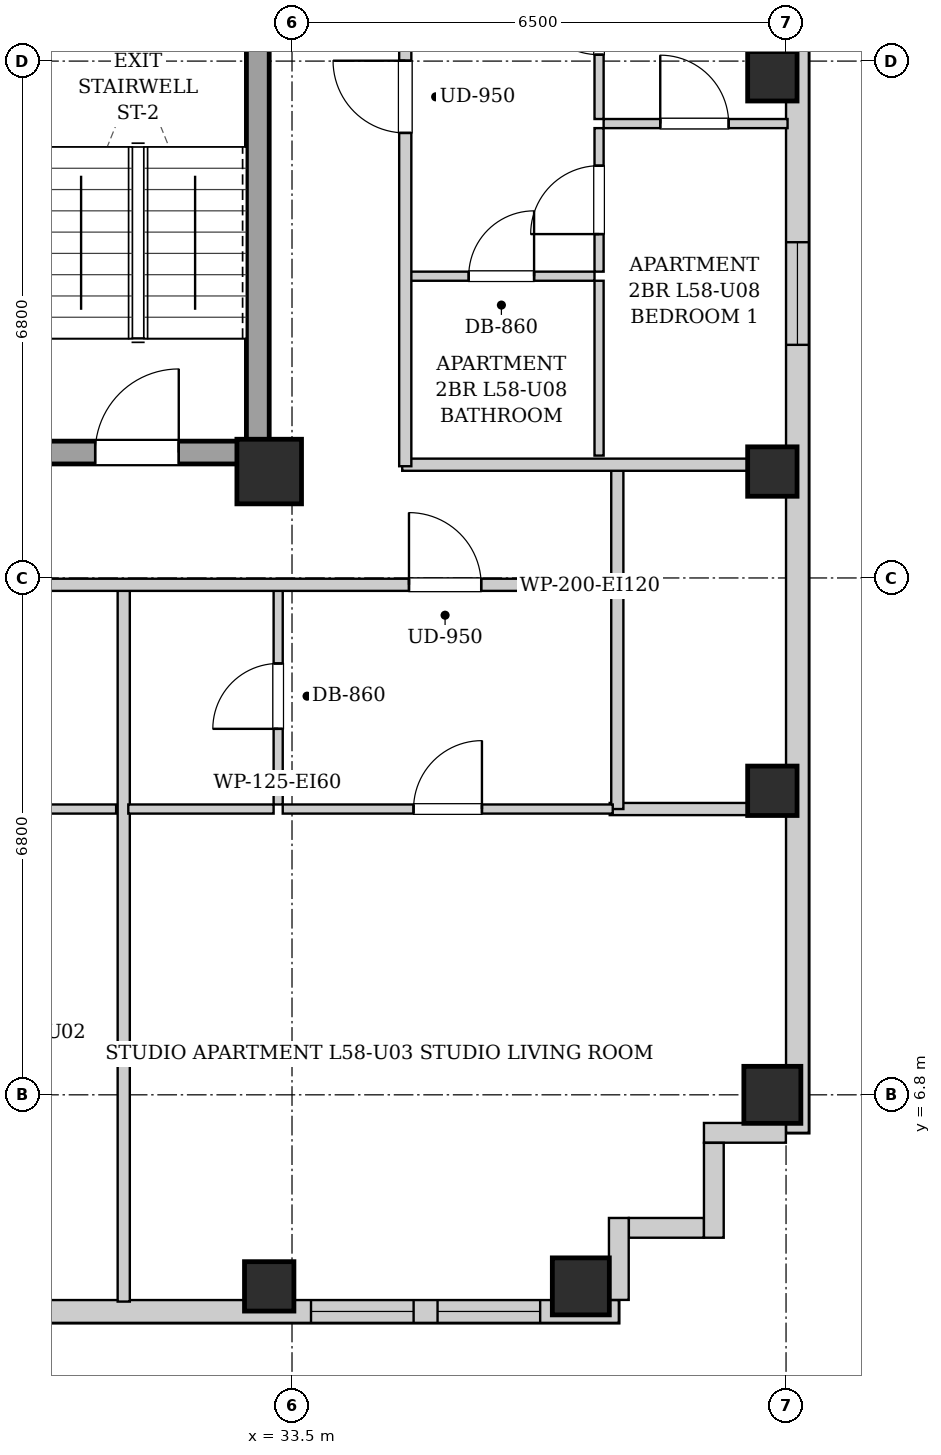
"""IFC4 building model, lengths in metres.
Left out: names, types, materials, properties, quantities, classifications, styles, units other than length and angle.
Written with IfcOpenShell. Run it as: python <this file> out.ifc"""

import sys

from ifc_helpers import new_model, si_unit, direction, frame, frame_2d, origin, origin_2d, place, context, subcontext, project, spatial, rectangle, extrude, element, fill, save


model = new_model("IFC4")
c1 = context("Model", 3, precision=1e-05, world=origin(), true_north=direction((0.0, 1.0)))
c2 = subcontext(c1, "Body", "Model", "MODEL_VIEW")
j1 = project(units=[si_unit("LENGTHUNIT", "METRE"), si_unit("PLANEANGLEUNIT", "RADIAN")], contexts=[c1])
p1 = place(None, origin())
s1 = spatial("IfcSite", under=j1, at=p1, CompositionType="ELEMENT")
p2 = place(p1, origin())
s2 = spatial("IfcBuilding", under=s1, at=p2, CompositionType="ELEMENT")
p3 = place(p2, frame((0.0, 0.0, 200.8)))
s3 = spatial("IfcBuildingStorey", under=s2, at=p3, CompositionType="ELEMENT", Elevation=200.8)
p4 = place(p3, frame((33.2, 4.28, 0.0), z_axis=(0.0, 0.0, 1.0), x_axis=(1.0, 0.0, 0.0)))
e1 = element("IfcColumn", 1, at=p4, inside=s3, PredefinedType="COLUMN", context=c2, shape_type="SweptSolid", body=[
    extrude(rectangle(XDim=0.65, YDim=0.65, at=origin_2d()), origin(), (0.0, 0.0, 1.0), 3.3),
])
for number, where, z_axis, x_axis in (
    (2, (37.3, 4.28, 0.0), (0.0, 0.0, 1.0), (1.0, 0.0, 0.0)),
    (3, (39.82, 6.8, 0.0), (0.0, 0.0, 1.0), (1.0, 0.0, 0.0)),
):
    element("IfcColumn", number, at=place(p3, frame(where, z_axis=z_axis, x_axis=x_axis)), inside=s3, PredefinedType="COLUMN", context=c2, shape_type="SweptSolid", body=[
        extrude(rectangle(XDim=0.75, YDim=0.75, at=origin_2d()), origin(), (0.0, 0.0, 1.0), 3.3),
    ])
for number, where, z_axis, x_axis in (
    (4, (39.82, 10.8, 0.0), (0.0, 0.0, 1.0), (1.0, 0.0, 0.0)),
    (5, (39.82, 15.0, 0.0), (0.0, 0.0, 1.0), (1.0, 0.0, 0.0)),
    (6, (39.82, 20.2, 0.0), (0.0, 0.0, 1.0), (1.0, 0.0, 0.0)),
):
    element("IfcColumn", number, at=place(p3, frame(where, z_axis=z_axis, x_axis=x_axis)), inside=s3, PredefinedType="COLUMN", context=c2, shape_type="SweptSolid", body=[
        extrude(rectangle(XDim=0.65, YDim=0.65, at=origin_2d()), origin(), (0.0, 0.0, 1.0), 3.3),
    ])
p5 = place(p3, frame((33.2, 15.0, 0.0), z_axis=(0.0, 0.0, 1.0), x_axis=(1.0, 0.0, 0.0)))
e7 = element("IfcColumn", 7, at=p5, inside=s3, PredefinedType="COLUMN", context=c2, shape_type="SweptSolid", body=[
    extrude(rectangle(XDim=0.85, YDim=0.85, at=origin_2d()), origin(), (0.0, 0.0, 1.0), 3.3),
])
p6 = place(p3, frame((40.15, 37.7, 0.0), z_axis=(0.0, 0.0, 1.0), x_axis=(0.0, -1.0, 0.0)))
e8 = element("IfcWall", 8, at=p6, inside=s3, PredefinedType="SOLIDWALL", context=c2, shape_type="SweptSolid", body=[
    extrude(rectangle(XDim=31.4, YDim=0.3, at=frame_2d((15.7, 0.0))), origin(), (0.0, 0.0, 1.0), 3.04),
])
p7 = place(p6, frame((1.504, 0.0, 0.55)))
e9 = element("IfcOpeningElement", 9, at=p7, cuts=e8, PredefinedType="OPENING", context=c2, shape_type="SweptSolid", body=[
    extrude(rectangle(XDim=1.35, YDim=1.2, at=frame_2d((0.675, 0.6))), frame((0.0, 0.16, 0.0), z_axis=(0.0, -1.0, 0.0), x_axis=(1.0, 0.0, 0.0)), (0.0, 0.0, 1.0), 0.32),
])
p8 = place(p6, frame((19.683, 0.0, 0.55)))
e10 = element("IfcOpeningElement", 10, at=p8, cuts=e8, PredefinedType="OPENING", context=c2, shape_type="SweptSolid", body=[
    extrude(rectangle(XDim=1.35, YDim=1.2, at=frame_2d((0.675, 0.6))), frame((0.0, 0.16, 0.0), z_axis=(0.0, -1.0, 0.0), x_axis=(1.0, 0.0, 0.0)), (0.0, 0.0, 1.0), 0.32),
])
p9 = place(p6, frame((10.367, 0.0, 0.55)))
e11 = element("IfcOpeningElement", 11, at=p9, cuts=e8, PredefinedType="OPENING", context=c2, shape_type="SweptSolid", body=[
    extrude(rectangle(XDim=1.35, YDim=1.2, at=frame_2d((0.675, 0.6))), frame((0.0, 0.16, 0.0), z_axis=(0.0, -1.0, 0.0), x_axis=(1.0, 0.0, 0.0)), (0.0, 0.0, 1.0), 0.32),
])
p10 = place(p3, frame((37.8, 3.95, 0.0), z_axis=(0.0, 0.0, 1.0), x_axis=(-1.0, 0.0, 0.0)))
e12 = element("IfcWall", 12, at=p10, inside=s3, PredefinedType="SOLIDWALL", context=c2, shape_type="SweptSolid", body=[
    extrude(rectangle(XDim=18.15, YDim=0.3, at=frame_2d((9.075, 0.0))), origin(), (0.0, 0.0, 1.0), 3.04),
])
p11 = place(p10, frame((15.6, 0.0, 0.55)))
e13 = element("IfcOpeningElement", 13, at=p11, cuts=e12, PredefinedType="OPENING", context=c2, shape_type="SweptSolid", body=[
    extrude(rectangle(XDim=1.35, YDim=1.2, at=frame_2d((0.675, 0.6))), frame((0.0, 0.16, 0.0), z_axis=(0.0, -1.0, 0.0), x_axis=(1.0, 0.0, 0.0)), (0.0, 0.0, 1.0), 0.32),
])
p12 = place(p10, frame((8.1, 0.0, 0.55)))
e14 = element("IfcOpeningElement", 14, at=p12, cuts=e12, PredefinedType="OPENING", context=c2, shape_type="SweptSolid", body=[
    extrude(rectangle(XDim=1.35, YDim=1.2, at=frame_2d((0.675, 0.6))), frame((0.0, 0.16, 0.0), z_axis=(0.0, -1.0, 0.0), x_axis=(1.0, 0.0, 0.0)), (0.0, 0.0, 1.0), 0.32),
])
p13 = place(p10, frame((2.7, 0.0, 0.55)))
e15 = element("IfcOpeningElement", 15, at=p13, cuts=e12, PredefinedType="OPENING", context=c2, shape_type="SweptSolid", body=[
    extrude(rectangle(XDim=1.35, YDim=1.2, at=frame_2d((0.675, 0.6))), frame((0.0, 0.16, 0.0), z_axis=(0.0, -1.0, 0.0), x_axis=(1.0, 0.0, 0.0)), (0.0, 0.0, 1.0), 0.32),
])
p14 = place(p10, frame((1.035, 0.0, 0.55)))
e16 = element("IfcOpeningElement", 16, at=p14, cuts=e12, PredefinedType="OPENING", context=c2, shape_type="SweptSolid", body=[
    extrude(rectangle(XDim=1.35, YDim=1.2, at=frame_2d((0.675, 0.6))), frame((0.0, 0.16, 0.0), z_axis=(0.0, -1.0, 0.0), x_axis=(1.0, 0.0, 0.0)), (0.0, 0.0, 1.0), 0.32),
])
p15 = place(p3, frame((39.998, 6.3, 0.0), z_axis=(0.0, 0.0, 1.0), x_axis=(-1.0, 0.0, 0.0)))
e17 = element("IfcWall", 17, at=p15, inside=s3, PredefinedType="SOLIDWALL", context=c2, shape_type="SweptSolid", body=[
    extrude(rectangle(XDim=1.078, YDim=0.26, at=frame_2d((0.539, 0.0))), origin(), (0.0, 0.0, 1.0), 3.04),
])
p16 = place(p3, frame((39.05, 6.168, 0.0), z_axis=(0.0, 0.0, 1.0), x_axis=(0.0, -1.0, 0.0)))
e18 = element("IfcWall", 18, at=p16, inside=s3, PredefinedType="SOLIDWALL", context=c2, shape_type="SweptSolid", body=[
    extrude(rectangle(XDim=1.248, YDim=0.26, at=frame_2d((0.624, 0.0))), origin(), (0.0, 0.0, 1.0), 3.04),
])
p17 = place(p3, frame((38.918, 5.05, 0.0), z_axis=(0.0, 0.0, 1.0), x_axis=(-1.0, 0.0, 0.0)))
e19 = element("IfcWall", 19, at=p17, inside=s3, PredefinedType="SOLIDWALL", context=c2, shape_type="SweptSolid", body=[
    extrude(rectangle(XDim=0.986, YDim=0.26, at=frame_2d((0.493, 0.0))), origin(), (0.0, 0.0, 1.0), 3.04),
])
p18 = place(p3, frame((37.8, 5.18, 0.0), z_axis=(0.0, 0.0, 1.0), x_axis=(0.0, -1.0, 0.0)))
e20 = element("IfcWall", 20, at=p18, inside=s3, PredefinedType="SOLIDWALL", context=c2, shape_type="SweptSolid", body=[
    extrude(rectangle(XDim=1.078, YDim=0.26, at=frame_2d((0.539, 0.0))), origin(), (0.0, 0.0, 1.0), 3.04),
])
p19 = place(p3, frame((33.05, 15.1, 0.0), z_axis=(0.0, 0.0, 1.0), x_axis=(0.0, 1.0, 0.0)))
e21 = element("IfcWall", 21, at=p19, inside=s3, PredefinedType="SHEAR", context=c2, shape_type="SweptSolid", body=[
    extrude(rectangle(XDim=9.0, YDim=0.3, at=frame_2d((4.5, 0.0))), origin(), (0.0, 0.0, 1.0), 3.04),
])
p20 = place(p3, frame((30.05, 15.25, 0.0), z_axis=(0.0, 0.0, 1.0), x_axis=(1.0, 0.0, 0.0)))
e22 = element("IfcWall", 22, at=p20, inside=s3, PredefinedType="SHEAR", context=c2, shape_type="SweptSolid", body=[
    extrude(rectangle(XDim=2.85, YDim=0.3, at=frame_2d((1.425, 0.0))), origin(), (0.0, 0.0, 1.0), 3.04),
])
p21 = place(p20, frame((0.86, 0.0, 0.0)))
e23 = element("IfcOpeningElement", 23, at=p21, cuts=e22, PredefinedType="OPENING", context=c2, shape_type="SweptSolid", body=[
    extrude(rectangle(XDim=1.1, YDim=2.05, at=frame_2d((0.55, 1.025))), frame((0.0, 0.16, 0.0), z_axis=(0.0, -1.0, 0.0), x_axis=(1.0, 0.0, 0.0)), (0.0, 0.0, 1.0), 0.32),
])
p22 = place(p3, frame((37.78, 13.51, 0.0), z_axis=(0.0, 0.0, 1.0), x_axis=(0.0, 1.0, 0.0)))
e24 = element("IfcWall", 24, at=p22, inside=s3, PredefinedType="PARTITIONING", context=c2, shape_type="SweptSolid", body=[
    extrude(rectangle(XDim=1.58, YDim=0.16, at=frame_2d((0.79, 0.0))), origin(), (0.0, 0.0, 1.0), 3.04),
])
p23 = place(p3, frame((34.95, 15.09, 0.0), z_axis=(0.0, 0.0, 1.0), x_axis=(1.0, 0.0, 0.0)))
e25 = element("IfcWall", 25, at=p23, inside=s3, PredefinedType="PARTITIONING", context=c2, shape_type="SweptSolid", body=[
    extrude(rectangle(XDim=5.07, YDim=0.16, at=frame_2d((2.535, 0.0))), origin(), (0.0, 0.0, 1.0), 2.556),
])
p24 = place(p3, frame((27.156, 10.56, 0.0), z_axis=(0.0, 0.0, 1.0), x_axis=(1.0, 0.0, 0.0)))
e26 = element("IfcWall", 26, at=p24, inside=s3, PredefinedType="PARTITIONING", context=c2, shape_type="SweptSolid", body=[
    extrude(rectangle(XDim=4.03, YDim=0.12, at=frame_2d((2.015, 0.0))), origin(), (0.0, 0.0, 1.0), 3.04),
])
p25 = place(p24, frame((1.565, 0.0, 0.0)))
e27 = element("IfcOpeningElement", 27, at=p25, cuts=e26, PredefinedType="OPENING", context=c2, shape_type="SweptSolid", body=[
    extrude(rectangle(XDim=0.9, YDim=2.05, at=frame_2d((0.45, 1.025))), frame((0.0, 0.07, 0.0), z_axis=(0.0, -1.0, 0.0), x_axis=(1.0, 0.0, 0.0)), (0.0, 0.0, 1.0), 0.14),
])
p26 = place(p3, frame((37.68, 10.56, 0.0), z_axis=(0.0, 0.0, 1.0), x_axis=(1.0, 0.0, 0.0)))
e28 = element("IfcWall", 28, at=p26, inside=s3, PredefinedType="PARTITIONING", context=c2, shape_type="SweptSolid", body=[
    extrude(rectangle(XDim=2.34, YDim=0.16, at=frame_2d((1.17, 0.0))), origin(), (0.0, 0.0, 1.0), 3.04),
])
p27 = place(p3, frame((37.78, 10.56, 0.0), z_axis=(0.0, 0.0, 1.0), x_axis=(0.0, 1.0, 0.0)))
e29 = element("IfcWall", 29, at=p27, inside=s3, PredefinedType="PARTITIONING", context=c2, shape_type="SweptSolid", body=[
    extrude(rectangle(XDim=2.91, YDim=0.16, at=frame_2d((1.455, 0.0))), origin(), (0.0, 0.0, 1.0), 3.04),
])
p28 = place(p3, frame((31.286, 4.08, 0.0), z_axis=(0.0, 0.0, 1.0), x_axis=(0.0, 1.0, 0.0)))
e30 = element("IfcWall", 30, at=p28, inside=s3, PredefinedType="PARTITIONING", context=c2, shape_type="SweptSolid", body=[
    extrude(rectangle(XDim=9.39, YDim=0.16, at=frame_2d((4.695, 0.0))), origin(), (0.0, 0.0, 1.0), 3.04),
])
p29 = place(p3, frame((33.318, 10.62, 0.0), z_axis=(0.0, 0.0, 1.0), x_axis=(0.0, 1.0, 0.0)))
e31 = element("IfcWall", 31, at=p29, inside=s3, PredefinedType="PARTITIONING", context=c2, shape_type="SweptSolid", body=[
    extrude(rectangle(XDim=2.85, YDim=0.12, at=frame_2d((1.425, 0.0))), origin(), (0.0, 0.0, 1.0), 3.04),
])
p30 = place(p29, frame((0.995, 0.0, 0.0)))
e32 = element("IfcOpeningElement", 32, at=p30, cuts=e31, PredefinedType="OPENING", context=c2, shape_type="SweptSolid", body=[
    extrude(rectangle(XDim=0.86, YDim=2.05, at=frame_2d((0.43, 1.025))), frame((0.0, 0.07, 0.0), z_axis=(0.0, -1.0, 0.0), x_axis=(1.0, 0.0, 0.0)), (0.0, 0.0, 1.0), 0.14),
])
p31 = place(p3, frame((31.346, 10.56, 0.0), z_axis=(0.0, 0.0, 1.0), x_axis=(1.0, 0.0, 0.0)))
e33 = element("IfcWall", 33, at=p31, inside=s3, PredefinedType="PARTITIONING", context=c2, shape_type="SweptSolid", body=[
    extrude(rectangle(XDim=1.912, YDim=0.12, at=frame_2d((0.956, 0.0))), origin(), (0.0, 0.0, 1.0), 3.04),
])
p32 = place(p3, frame((33.378, 10.56, 0.0), z_axis=(0.0, 0.0, 1.0), x_axis=(1.0, 0.0, 0.0)))
e34 = element("IfcWall", 34, at=p32, inside=s3, PredefinedType="PARTITIONING", context=c2, shape_type="SweptSolid", body=[
    extrude(rectangle(XDim=4.342, YDim=0.12, at=frame_2d((2.171, 0.0))), origin(), (0.0, 0.0, 1.0), 3.04),
])
p33 = place(p32, frame((1.721, 0.0, 0.0)))
e35 = element("IfcOpeningElement", 35, at=p33, cuts=e34, PredefinedType="OPENING", context=c2, shape_type="SweptSolid", body=[
    extrude(rectangle(XDim=0.9, YDim=2.05, at=frame_2d((0.45, 1.025))), frame((0.0, 0.07, 0.0), z_axis=(0.0, -1.0, 0.0), x_axis=(1.0, 0.0, 0.0)), (0.0, 0.0, 1.0), 0.14),
])
p34 = place(p3, frame((35.03, 17.57, 0.0), z_axis=(0.0, 0.0, 1.0), x_axis=(1.0, 0.0, 0.0)))
e36 = element("IfcWall", 36, at=p34, inside=s3, PredefinedType="PARTITIONING", context=c2, shape_type="SweptSolid", body=[
    extrude(rectangle(XDim=2.45, YDim=0.12, at=frame_2d((1.225, 0.0))), origin(), (0.0, 0.0, 1.0), 3.04),
])
p35 = place(p34, frame((0.795, 0.0, 0.0)))
e37 = element("IfcOpeningElement", 37, at=p35, cuts=e36, PredefinedType="OPENING", context=c2, shape_type="SweptSolid", body=[
    extrude(rectangle(XDim=0.86, YDim=2.05, at=frame_2d((0.43, 1.025))), frame((0.0, 0.07, 0.0), z_axis=(0.0, -1.0, 0.0), x_axis=(1.0, 0.0, 0.0)), (0.0, 0.0, 1.0), 0.14),
])
p36 = place(p3, frame((37.54, 15.21, 0.0), z_axis=(0.0, 0.0, 1.0), x_axis=(0.0, 1.0, 0.0)))
e38 = element("IfcWall", 38, at=p36, inside=s3, PredefinedType="PARTITIONING", context=c2, shape_type="SweptSolid", body=[
    extrude(rectangle(XDim=2.3, YDim=0.12, at=frame_2d((1.15, 0.0))), origin(), (0.0, 0.0, 1.0), 3.04),
])
p37 = place(p3, frame((37.54, 17.63, 0.0), z_axis=(0.0, 0.0, 1.0), x_axis=(0.0, 1.0, 0.0)))
e39 = element("IfcWall", 39, at=p37, inside=s3, PredefinedType="PARTITIONING", context=c2, shape_type="SweptSolid", body=[
    extrude(rectangle(XDim=1.888, YDim=0.12, at=frame_2d((0.944, 0.0))), origin(), (0.0, 0.0, 1.0), 3.04),
])
p38 = place(p37, frame((0.494, 0.0, 0.0)))
e40 = element("IfcOpeningElement", 40, at=p38, cuts=e39, PredefinedType="OPENING", context=c2, shape_type="SweptSolid", body=[
    extrude(rectangle(XDim=0.9, YDim=2.05, at=frame_2d((0.45, 1.025))), frame((0.0, 0.07, 0.0), z_axis=(0.0, -1.0, 0.0), x_axis=(1.0, 0.0, 0.0)), (0.0, 0.0, 1.0), 0.14),
])
p39 = place(p3, frame((37.54, 19.638, 0.0), z_axis=(0.0, 0.0, 1.0), x_axis=(0.0, 1.0, 0.0)))
e41 = element("IfcWall", 41, at=p39, inside=s3, PredefinedType="PARTITIONING", context=c2, shape_type="SweptSolid", body=[
    extrude(rectangle(XDim=2.592, YDim=0.12, at=frame_2d((1.296, 0.0))), origin(), (0.0, 0.0, 1.0), 3.04),
])
p40 = place(p39, frame((0.846, 0.0, 0.0)))
e42 = element("IfcOpeningElement", 42, at=p40, cuts=e41, PredefinedType="OPENING", context=c2, shape_type="SweptSolid", body=[
    extrude(rectangle(XDim=0.9, YDim=2.05, at=frame_2d((0.45, 1.025))), frame((0.0, 0.07, 0.0), z_axis=(0.0, -1.0, 0.0), x_axis=(1.0, 0.0, 0.0)), (0.0, 0.0, 1.0), 0.14),
])
p41 = place(p3, frame((37.6, 19.578, 0.0), z_axis=(0.0, 0.0, 1.0), x_axis=(1.0, 0.0, 0.0)))
e43 = element("IfcWall", 43, at=p41, inside=s3, PredefinedType="PARTITIONING", context=c2, shape_type="SweptSolid", body=[
    extrude(rectangle(XDim=2.42, YDim=0.12, at=frame_2d((1.21, 0.0))), origin(), (0.0, 0.0, 1.0), 3.04),
])
p42 = place(p41, frame((0.745, 0.0, 0.0)))
e44 = element("IfcOpeningElement", 44, at=p42, cuts=e43, PredefinedType="OPENING", context=c2, shape_type="SweptSolid", body=[
    extrude(rectangle(XDim=0.9, YDim=2.05, at=frame_2d((0.45, 1.025))), frame((0.0, 0.07, 0.0), z_axis=(0.0, -1.0, 0.0), x_axis=(1.0, 0.0, 0.0)), (0.0, 0.0, 1.0), 0.14),
])
p43 = place(p3, frame((13.15, 13.51, 0.0), z_axis=(0.0, 0.0, 1.0), x_axis=(1.0, 0.0, 0.0)))
e45 = element("IfcWall", 45, at=p43, inside=s3, PredefinedType="PARTITIONING", context=c2, shape_type="SweptSolid", body=[
    extrude(rectangle(XDim=24.6, YDim=0.16, at=frame_2d((12.3, 0.0))), origin(), (0.0, 0.0, 1.0), 3.04),
])
p44 = place(p43, frame((1.323, 0.0, 0.0)))
e46 = element("IfcOpeningElement", 46, at=p44, cuts=e45, PredefinedType="OPENING", context=c2, shape_type="SweptSolid", body=[
    extrude(rectangle(XDim=0.95, YDim=2.1, at=frame_2d((0.475, 1.05))), frame((0.0, 0.09, 0.0), z_axis=(0.0, -1.0, 0.0), x_axis=(1.0, 0.0, 0.0)), (0.0, 0.0, 1.0), 0.18),
])
p45 = place(p43, frame((8.585, 0.0, 0.0)))
e47 = element("IfcOpeningElement", 47, at=p45, cuts=e45, PredefinedType="OPENING", context=c2, shape_type="SweptSolid", body=[
    extrude(rectangle(XDim=0.95, YDim=2.1, at=frame_2d((0.475, 1.05))), frame((0.0, 0.09, 0.0), z_axis=(0.0, -1.0, 0.0), x_axis=(1.0, 0.0, 0.0)), (0.0, 0.0, 1.0), 0.18),
])
p46 = place(p43, frame((21.889, 0.0, 0.0)))
e48 = element("IfcOpeningElement", 48, at=p46, cuts=e45, PredefinedType="OPENING", context=c2, shape_type="SweptSolid", body=[
    extrude(rectangle(XDim=0.95, YDim=2.1, at=frame_2d((0.475, 1.05))), frame((0.0, 0.09, 0.0), z_axis=(0.0, -1.0, 0.0), x_axis=(1.0, 0.0, 0.0)), (0.0, 0.0, 1.0), 0.18),
])
p47 = place(p3, frame((34.99, 15.07, 0.0), z_axis=(0.0, 0.0, 1.0), x_axis=(0.0, 1.0, 0.0)))
e49 = element("IfcWall", 49, at=p47, inside=s3, PredefinedType="PARTITIONING", context=c2, shape_type="SweptSolid", body=[
    extrude(rectangle(XDim=13.93, YDim=0.16, at=frame_2d((6.965, 0.0))), origin(), (0.0, 0.0, 1.0), 3.04),
])
p48 = place(p47, frame((4.385, 0.0, 0.0)))
e50 = element("IfcOpeningElement", 50, at=p48, cuts=e49, PredefinedType="OPENING", context=c2, shape_type="SweptSolid", body=[
    extrude(rectangle(XDim=0.95, YDim=2.1, at=frame_2d((0.475, 1.05))), frame((0.0, 0.09, 0.0), z_axis=(0.0, -1.0, 0.0), x_axis=(1.0, 0.0, 0.0)), (0.0, 0.0, 1.0), 0.18),
])
p49 = place(p21, origin())
e51 = element("IfcDoor", 51, at=p49, inside=s3, OperationType="SINGLE_SWING_RIGHT", PredefinedType="DOOR", context=c2, shape_type="SweptSolid", body=[
    extrude(rectangle(XDim=1.1, YDim=2.05, at=frame_2d((0.55, 1.025))), frame((0.0, 0.025, 0.0), z_axis=(0.0, -1.0, 0.0), x_axis=(1.0, 0.0, 0.0)), (0.0, 0.0, 1.0), 0.05),
])
fill(e23, e51)
p50 = place(p30, origin())
e52 = element("IfcDoor", 52, at=p50, inside=s3, OperationType="SINGLE_SWING_LEFT", PredefinedType="DOOR", context=c2, shape_type="SweptSolid", body=[
    extrude(rectangle(XDim=0.86, YDim=2.05, at=frame_2d((0.43, 1.025))), frame((0.0, 0.025, 0.0), z_axis=(0.0, -1.0, 0.0), x_axis=(1.0, 0.0, 0.0)), (0.0, 0.0, 1.0), 0.05),
])
fill(e32, e52)
p51 = place(p33, origin())
e53 = element("IfcDoor", 53, at=p51, inside=s3, OperationType="SINGLE_SWING_RIGHT", PredefinedType="DOOR", context=c2, shape_type="SweptSolid", body=[
    extrude(rectangle(XDim=0.9, YDim=2.05, at=frame_2d((0.45, 1.025))), frame((0.0, 0.025, 0.0), z_axis=(0.0, -1.0, 0.0), x_axis=(1.0, 0.0, 0.0)), (0.0, 0.0, 1.0), 0.05),
])
fill(e35, e53)
p52 = place(p35, origin())
e54 = element("IfcDoor", 54, at=p52, inside=s3, OperationType="SINGLE_SWING_RIGHT", PredefinedType="DOOR", context=c2, shape_type="SweptSolid", body=[
    extrude(rectangle(XDim=0.86, YDim=2.05, at=frame_2d((0.43, 1.025))), frame((0.0, 0.025, 0.0), z_axis=(0.0, -1.0, 0.0), x_axis=(1.0, 0.0, 0.0)), (0.0, 0.0, 1.0), 0.05),
])
fill(e37, e54)
p53 = place(p38, origin())
e55 = element("IfcDoor", 55, at=p53, inside=s3, OperationType="SINGLE_SWING_LEFT", PredefinedType="DOOR", context=c2, shape_type="SweptSolid", body=[
    extrude(rectangle(XDim=0.9, YDim=2.05, at=frame_2d((0.45, 1.025))), frame((0.0, 0.025, 0.0), z_axis=(0.0, -1.0, 0.0), x_axis=(1.0, 0.0, 0.0)), (0.0, 0.0, 1.0), 0.05),
])
fill(e40, e55)
p54 = place(p40, origin())
e56 = element("IfcDoor", 56, at=p54, inside=s3, OperationType="SINGLE_SWING_RIGHT", PredefinedType="DOOR", context=c2, shape_type="SweptSolid", body=[
    extrude(rectangle(XDim=0.9, YDim=2.05, at=frame_2d((0.45, 1.025))), frame((0.0, 0.025, 0.0), z_axis=(0.0, -1.0, 0.0), x_axis=(1.0, 0.0, 0.0)), (0.0, 0.0, 1.0), 0.05),
])
fill(e42, e56)
p55 = place(p42, origin())
e57 = element("IfcDoor", 57, at=p55, inside=s3, OperationType="SINGLE_SWING_LEFT", PredefinedType="DOOR", context=c2, shape_type="SweptSolid", body=[
    extrude(rectangle(XDim=0.9, YDim=2.05, at=frame_2d((0.45, 1.025))), frame((0.0, 0.025, 0.0), z_axis=(0.0, -1.0, 0.0), x_axis=(1.0, 0.0, 0.0)), (0.0, 0.0, 1.0), 0.05),
])
fill(e44, e57)
p56 = place(p46, origin())
e58 = element("IfcDoor", 58, at=p56, inside=s3, OperationType="SINGLE_SWING_LEFT", PredefinedType="DOOR", context=c2, shape_type="SweptSolid", body=[
    extrude(rectangle(XDim=0.95, YDim=2.1, at=frame_2d((0.475, 1.05))), frame((0.0, 0.025, 0.0), z_axis=(0.0, -1.0, 0.0), x_axis=(1.0, 0.0, 0.0)), (0.0, 0.0, 1.0), 0.05),
])
fill(e48, e58)
p57 = place(p48, origin())
e59 = element("IfcDoor", 59, at=p57, inside=s3, OperationType="SINGLE_SWING_RIGHT", PredefinedType="DOOR", context=c2, shape_type="SweptSolid", body=[
    extrude(rectangle(XDim=0.95, YDim=2.1, at=frame_2d((0.475, 1.05))), frame((0.0, 0.025, 0.0), z_axis=(0.0, -1.0, 0.0), x_axis=(1.0, 0.0, 0.0)), (0.0, 0.0, 1.0), 0.05),
])
fill(e50, e59)
p58 = place(p13, origin())
e60 = element("IfcWindow", 60, at=p58, inside=s3, PartitioningType="SINGLE_PANEL", PredefinedType="WINDOW", context=c2, shape_type="SweptSolid", body=[
    extrude(rectangle(XDim=1.35, YDim=1.2, at=frame_2d((0.675, 0.6))), frame((0.0, 0.03, 0.0), z_axis=(0.0, -1.0, 0.0), x_axis=(1.0, 0.0, 0.0)), (0.0, 0.0, 1.0), 0.06),
])
fill(e15, e60)
p59 = place(p14, origin())
e61 = element("IfcWindow", 61, at=p59, inside=s3, PartitioningType="SINGLE_PANEL", PredefinedType="WINDOW", context=c2, shape_type="SweptSolid", body=[
    extrude(rectangle(XDim=1.35, YDim=1.2, at=frame_2d((0.675, 0.6))), frame((0.0, 0.03, 0.0), z_axis=(0.0, -1.0, 0.0), x_axis=(1.0, 0.0, 0.0)), (0.0, 0.0, 1.0), 0.06),
])
fill(e16, e61)
p60 = place(p8, origin())
e62 = element("IfcWindow", 62, at=p60, inside=s3, PartitioningType="SINGLE_PANEL", PredefinedType="WINDOW", context=c2, shape_type="SweptSolid", body=[
    extrude(rectangle(XDim=1.35, YDim=1.2, at=frame_2d((0.675, 0.6))), frame((0.0, 0.03, 0.0), z_axis=(0.0, -1.0, 0.0), x_axis=(1.0, 0.0, 0.0)), (0.0, 0.0, 1.0), 0.06),
])
fill(e10, e62)
save(model, sys.argv[1])
